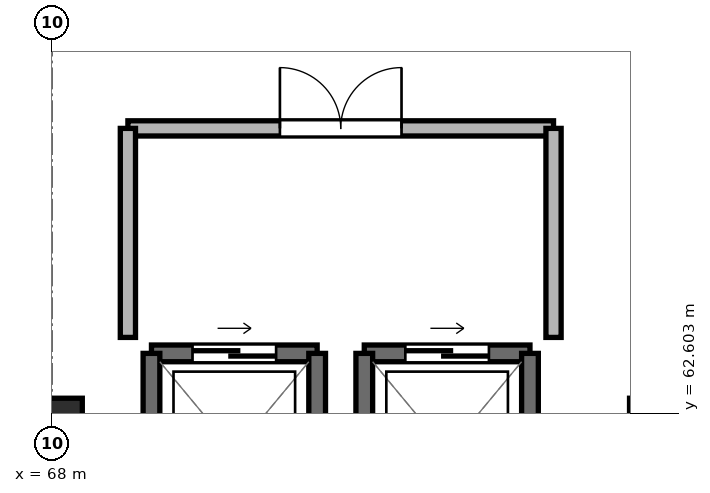
"""IFC4 building model, lengths in metres.
Left out: names, types, materials, properties, quantities, classifications, styles, units other than length and angle.
Written with IfcOpenShell. Run it as: python <this file> out.ifc"""

import sys

from ifc_helpers import new_model, si_unit, direction, frame, frame_2d, origin, origin_2d, place, context, subcontext, project, spatial, rectangle, extrude, element, fill, save


model = new_model("IFC4")
c1 = context("Model", 3, precision=1e-05, world=origin(), true_north=direction((0.0, 1.0)))
c2 = subcontext(c1, "Body", "Model", "MODEL_VIEW")
j1 = project(units=[si_unit("LENGTHUNIT", "METRE"), si_unit("PLANEANGLEUNIT", "RADIAN")], contexts=[c1])
p1 = place(None, origin())
s1 = spatial("IfcSite", under=j1, at=p1, CompositionType="ELEMENT")
p2 = place(p1, origin())
s2 = spatial("IfcBuilding", under=s1, at=p2, CompositionType="ELEMENT")
p3 = place(p2, frame((0.0, 0.0, 43.8)))
s3 = spatial("IfcBuildingStorey", under=s2, at=p3, CompositionType="ELEMENT", Elevation=43.8)
for number, where, z_axis, x_axis in (
    (1, (68.0, 62.4, -0.24), (0.0, 0.0, 1.0), (1.0, 0.0, 0.0)),
    (2, (76.0, 62.4, -0.24), (0.0, 0.0, 1.0), (1.0, 0.0, 0.0)),
):
    element("IfcColumn", number, at=place(p3, frame(where, z_axis=z_axis, x_axis=x_axis)), inside=s3, PredefinedType="COLUMN", context=c2, shape_type="SweptSolid", body=[
        extrude(rectangle(XDim=0.8, YDim=0.8, at=origin_2d()), origin(), (0.0, 0.0, 1.0), 3.26),
    ])
p4 = place(p3, frame((71.49, 63.39, 0.0), z_axis=(0.0, 0.0, 1.0), x_axis=(-1.0, 0.0, 0.0)))
e3 = element("IfcWall", 3, at=p4, inside=s3, PredefinedType="SHEAR", context=c2, shape_type="SweptSolid", body=[
    extrude(rectangle(XDim=2.18, YDim=0.22, at=frame_2d((1.09, 0.0))), origin(), (0.0, 0.0, 1.0), 3.02),
])
p5 = place(p4, frame((0.54, 0.0, 0.0)))
e4 = element("IfcOpeningElement", 4, at=p5, cuts=e3, PredefinedType="OPENING", context=c2, shape_type="SweptSolid", body=[
    extrude(rectangle(XDim=1.1, YDim=2.2, at=frame_2d((0.55, 1.1))), frame((0.0, 0.122, 0.0), z_axis=(0.0, -1.0, 0.0), x_axis=(1.0, 0.0, 0.0)), (0.0, 0.0, 1.0), 0.244),
])
for number, where, z_axis, x_axis in (
    (5, (69.31, 63.39, 0.0), (0.0, 0.0, 1.0), (0.0, -1.0, 0.0)),
    (6, (71.49, 60.81, 0.0), (0.0, 0.0, 1.0), (0.0, 1.0, 0.0)),
):
    element("IfcWall", number, at=place(p3, frame(where, z_axis=z_axis, x_axis=x_axis)), inside=s3, PredefinedType="SHEAR", context=c2, shape_type="SweptSolid", body=[
        extrude(rectangle(XDim=2.58, YDim=0.22, at=frame_2d((1.29, 0.0))), origin(), (0.0, 0.0, 1.0), 3.02),
    ])
p6 = place(p3, frame((74.29, 63.39, 0.0), z_axis=(0.0, 0.0, 1.0), x_axis=(-1.0, 0.0, 0.0)))
e7 = element("IfcWall", 7, at=p6, inside=s3, PredefinedType="SHEAR", context=c2, shape_type="SweptSolid", body=[
    extrude(rectangle(XDim=2.18, YDim=0.22, at=frame_2d((1.09, 0.0))), origin(), (0.0, 0.0, 1.0), 3.02),
])
p7 = place(p6, frame((0.54, 0.0, 0.0)))
e8 = element("IfcOpeningElement", 8, at=p7, cuts=e7, PredefinedType="OPENING", context=c2, shape_type="SweptSolid", body=[
    extrude(rectangle(XDim=1.1, YDim=2.2, at=frame_2d((0.55, 1.1))), frame((0.0, 0.122, 0.0), z_axis=(0.0, -1.0, 0.0), x_axis=(1.0, 0.0, 0.0)), (0.0, 0.0, 1.0), 0.244),
])
for number, where, z_axis, x_axis in (
    (9, (72.11, 63.39, 0.0), (0.0, 0.0, 1.0), (0.0, -1.0, 0.0)),
    (10, (74.29, 60.81, 0.0), (0.0, 0.0, 1.0), (0.0, 1.0, 0.0)),
):
    element("IfcWall", number, at=place(p3, frame(where, z_axis=z_axis, x_axis=x_axis)), inside=s3, PredefinedType="SHEAR", context=c2, shape_type="SweptSolid", body=[
        extrude(rectangle(XDim=2.58, YDim=0.22, at=frame_2d((1.29, 0.0))), origin(), (0.0, 0.0, 1.0), 3.02),
    ])
p8 = place(p3, frame((69.0, 66.35, 0.0), z_axis=(0.0, 0.0, 1.0), x_axis=(1.0, 0.0, 0.0)))
e11 = element("IfcWall", 11, at=p8, inside=s3, PredefinedType="PARTITIONING", context=c2, shape_type="SweptSolid", body=[
    extrude(rectangle(XDim=5.6, YDim=0.2, at=frame_2d((2.8, 0.0))), origin(), (0.0, 0.0, 1.0), 2.53),
])
p9 = place(p8, frame((2.0, 0.0, 0.0)))
e12 = element("IfcOpeningElement", 12, at=p9, cuts=e11, PredefinedType="OPENING", context=c2, shape_type="SweptSolid", body=[
    extrude(rectangle(XDim=1.6, YDim=2.2, at=frame_2d((0.8, 1.1))), frame((0.0, 0.112, 0.0), z_axis=(0.0, -1.0, 0.0), x_axis=(1.0, 0.0, 0.0)), (0.0, 0.0, 1.0), 0.224),
])
for number, where, z_axis, x_axis in (
    (13, (69.0, 63.6, 0.0), (0.0, 0.0, 1.0), (0.0, 1.0, 0.0)),
    (14, (74.6, 63.6, 0.0), (0.0, 0.0, 1.0), (0.0, 1.0, 0.0)),
):
    element("IfcWall", number, at=place(p3, frame(where, z_axis=z_axis, x_axis=x_axis)), inside=s3, PredefinedType="PARTITIONING", context=c2, shape_type="SweptSolid", body=[
        extrude(rectangle(XDim=2.75, YDim=0.2, at=frame_2d((1.375, 0.0))), origin(), (0.0, 0.0, 1.0), 2.53),
    ])
p10 = place(p5, origin())
e15 = element("IfcDoor", 15, at=p10, inside=s3, OperationType="SLIDING_TO_LEFT", PredefinedType="DOOR", context=c2, shape_type="SweptSolid", body=[
    extrude(rectangle(XDim=1.1, YDim=2.2, at=frame_2d((0.55, 1.1))), frame((0.0, 0.025, 0.0), z_axis=(0.0, -1.0, 0.0), x_axis=(1.0, 0.0, 0.0)), (0.0, 0.0, 1.0), 0.05),
])
fill(e4, e15)
p11 = place(p7, origin())
e16 = element("IfcDoor", 16, at=p11, inside=s3, OperationType="SLIDING_TO_LEFT", PredefinedType="DOOR", context=c2, shape_type="SweptSolid", body=[
    extrude(rectangle(XDim=1.1, YDim=2.2, at=frame_2d((0.55, 1.1))), frame((0.0, 0.025, 0.0), z_axis=(0.0, -1.0, 0.0), x_axis=(1.0, 0.0, 0.0)), (0.0, 0.0, 1.0), 0.05),
])
fill(e8, e16)
p12 = place(p9, origin())
e17 = element("IfcDoor", 17, at=p12, inside=s3, OperationType="DOUBLE_DOOR_SINGLE_SWING", PredefinedType="DOOR", context=c2, shape_type="SweptSolid", body=[
    extrude(rectangle(XDim=1.6, YDim=2.2, at=frame_2d((0.8, 1.1))), frame((0.0, 0.025, 0.0), z_axis=(0.0, -1.0, 0.0), x_axis=(1.0, 0.0, 0.0)), (0.0, 0.0, 1.0), 0.05),
])
fill(e12, e17)
save(model, sys.argv[1])
